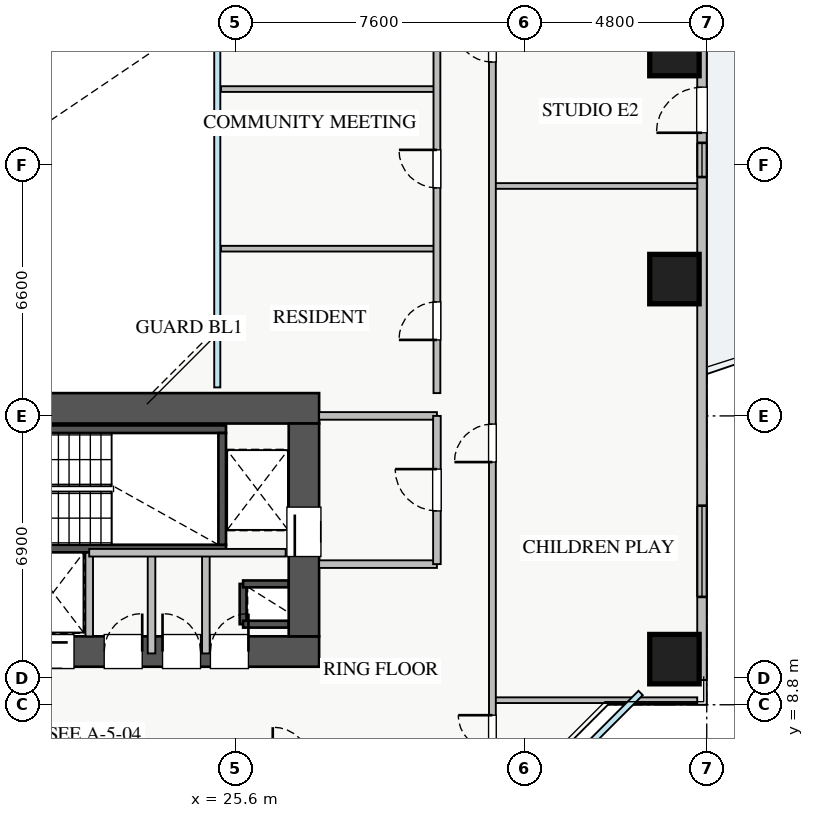
"""IFC4 building model, lengths in metres.
Left out: names, types, materials, properties, quantities, classifications, styles, units other than length and angle.
Written with IfcOpenShell. Run it as: python <this file> out.ifc"""

import sys

from ifc_helpers import new_model, si_unit, direction, frame, frame_2d, origin, origin_2d, place, context, subcontext, project, spatial, rectangle, extrude, source, transform, mapped, element, fill, save


model = new_model("IFC4")
c1 = context("Model", 3, precision=1e-05, world=origin(), true_north=direction((0.0, 1.0)))
c2 = subcontext(c1, "Body", "Model", "MODEL_VIEW")
j1 = project(units=[si_unit("LENGTHUNIT", "METRE"), si_unit("PLANEANGLEUNIT", "RADIAN")], contexts=[c1])
p1 = place(None, origin())
s1 = spatial("IfcSite", under=j1, at=p1, CompositionType="ELEMENT")
p2 = place(p1, origin())
s2 = spatial("IfcBuilding", under=s1, at=p2, CompositionType="ELEMENT")
p3 = place(p2, frame((0.0, 0.0, 66.5)))
s3 = spatial("IfcBuildingStorey", under=s2, at=p3, CompositionType="ELEMENT", Elevation=66.5)
p4 = place(p3, frame((25.8, 10.92, 0.0), z_axis=(0.0, 0.0, 1.0), x_axis=(0.0, 1.0, 0.0)))
e1 = element("IfcWall", 1, at=p4, inside=s3, PredefinedType="SHEAR", context=c2, shape_type="SweptSolid", body=[
    extrude(rectangle(XDim=1.06, YDim=0.18, at=frame_2d((0.53, 0.0))), origin(), (0.0, 0.0, 1.0), 3.07),
])
for number, where, z_axis, x_axis in (
    (2, (25.8, 11.98, 0.0), (0.0, 0.0, 1.0), (1.0, 0.0, 0.0)),
    (3, (25.8, 10.92, 0.0), (0.0, 0.0, 1.0), (1.0, 0.0, 0.0)),
):
    element("IfcWall", number, at=place(p3, frame(where, z_axis=z_axis, x_axis=x_axis)), inside=s3, PredefinedType="SHEAR", context=c2, shape_type="SweptSolid", body=[
        extrude(rectangle(XDim=1.2, YDim=0.18, at=frame_2d((0.6, 0.0))), origin(), (0.0, 0.0, 1.0), 3.07),
    ])
p5 = place(p3, frame((19.88, 12.8, 0.0), z_axis=(0.0, 0.0, 1.0), x_axis=(1.0, 0.0, 0.0)))
e4 = element("IfcWall", 4, at=p5, inside=s3, PredefinedType="SHEAR", context=c2, shape_type="SweptSolid", body=[
    extrude(rectangle(XDim=1.87, YDim=0.18, at=frame_2d((0.935, 0.0))), origin(), (0.0, 0.0, 1.0), 3.07),
])
p6 = place(p3, frame((18.2, 12.91, 0.0), z_axis=(0.0, 0.0, 1.0), x_axis=(1.0, 0.0, 0.0)))
e5 = element("IfcWall", 5, at=p6, inside=s3, PredefinedType="SHEAR", context=c2, shape_type="SweptSolid", body=[
    extrude(rectangle(XDim=7.15, YDim=0.2, at=frame_2d((3.575, 0.0))), origin(), (0.0, 0.0, 1.0), 3.25),
])
p7 = place(p6, frame((0.35, 0.0, 0.0)))
e6 = element("IfcOpeningElement", 6, at=p7, cuts=e5, PredefinedType="OPENING", context=c2, shape_type="SweptSolid", body=[
    extrude(rectangle(XDim=1.1, YDim=2.05, at=frame_2d((0.55, 1.025))), frame((0.0, 0.11, 0.0), z_axis=(0.0, -1.0, 0.0), x_axis=(1.0, 0.0, 0.0)), (0.0, 0.0, 1.0), 0.22),
])
p8 = place(p3, frame((18.2, 16.05, 0.0), z_axis=(0.0, 0.0, 1.0), x_axis=(1.0, 0.0, 0.0)))
e7 = element("IfcWall", 7, at=p8, inside=s3, PredefinedType="SHEAR", context=c2, shape_type="SweptSolid", body=[
    extrude(rectangle(XDim=7.15, YDim=0.2, at=frame_2d((3.575, 0.0))), origin(), (0.0, 0.0, 1.0), 3.25),
])
p9 = place(p3, frame((25.25, 13.01, 0.0), z_axis=(0.0, 0.0, 1.0), x_axis=(0.0, 1.0, 0.0)))
e8 = element("IfcWall", 8, at=p9, inside=s3, PredefinedType="SHEAR", context=c2, shape_type="SweptSolid", body=[
    extrude(rectangle(XDim=2.94, YDim=0.2, at=frame_2d((1.47, 0.0))), origin(), (0.0, 0.0, 1.0), 3.25),
])
p10 = place(p3, frame((10.2, 10.2, 0.0), z_axis=(0.0, 0.0, 1.0), x_axis=(1.0, 0.0, 0.0)))
e9 = element("IfcWall", 9, at=p10, inside=s3, PredefinedType="SHEAR", context=c2, shape_type="SweptSolid", body=[
    extrude(rectangle(XDim=17.6, YDim=0.8, at=frame_2d((8.8, 0.0))), origin(), (0.0, 0.0, 1.0), 3.25),
])
p11 = place(p10, frame((1.15, 0.0, 0.0)))
e10 = element("IfcOpeningElement", 10, at=p11, cuts=e9, PredefinedType="OPENING", context=c2, shape_type="SweptSolid", body=[
    extrude(rectangle(XDim=1.1, YDim=2.05, at=frame_2d((0.55, 1.025))), frame((0.0, 0.41, 0.0), z_axis=(0.0, -1.0, 0.0), x_axis=(1.0, 0.0, 0.0)), (0.0, 0.0, 1.0), 0.82),
])
p12 = place(p10, frame((8.3, 0.0, 0.0)))
e11 = element("IfcOpeningElement", 11, at=p12, cuts=e9, PredefinedType="OPENING", context=c2, shape_type="SweptSolid", body=[
    extrude(rectangle(XDim=1.1, YDim=2.05, at=frame_2d((0.55, 1.025))), frame((0.0, 0.41, 0.0), z_axis=(0.0, -1.0, 0.0), x_axis=(1.0, 0.0, 0.0)), (0.0, 0.0, 1.0), 0.82),
])
p13 = place(p10, frame((10.05, 0.0, 0.0)))
e12 = element("IfcOpeningElement", 12, at=p13, cuts=e9, PredefinedType="OPENING", context=c2, shape_type="SweptSolid", body=[
    extrude(rectangle(XDim=1.1, YDim=2.05, at=frame_2d((0.55, 1.025))), frame((0.0, 0.41, 0.0), z_axis=(0.0, -1.0, 0.0), x_axis=(1.0, 0.0, 0.0)), (0.0, 0.0, 1.0), 0.82),
])
p14 = place(p10, frame((14.74, 0.0, 0.0)))
e13 = element("IfcOpeningElement", 13, at=p14, cuts=e9, PredefinedType="OPENING", context=c2, shape_type="SweptSolid", body=[
    extrude(rectangle(XDim=1.0, YDim=2.05, at=frame_2d((0.5, 1.025))), frame((0.0, 0.41, 0.0), z_axis=(0.0, -1.0, 0.0), x_axis=(1.0, 0.0, 0.0)), (0.0, 0.0, 1.0), 0.82),
])
p15 = place(p10, frame((11.945, 0.0, 0.0)))
e14 = element("IfcOpeningElement", 14, at=p15, cuts=e9, PredefinedType="OPENING", context=c2, shape_type="SweptSolid", body=[
    extrude(rectangle(XDim=1.0, YDim=2.05, at=frame_2d((0.5, 1.025))), frame((0.0, 0.41, 0.0), z_axis=(0.0, -1.0, 0.0), x_axis=(1.0, 0.0, 0.0)), (0.0, 0.0, 1.0), 0.82),
])
p16 = place(p10, frame((13.48, 0.0, 0.0)))
e15 = element("IfcOpeningElement", 15, at=p16, cuts=e9, PredefinedType="OPENING", context=c2, shape_type="SweptSolid", body=[
    extrude(rectangle(XDim=1.0, YDim=2.05, at=frame_2d((0.5, 1.025))), frame((0.0, 0.41, 0.0), z_axis=(0.0, -1.0, 0.0), x_axis=(1.0, 0.0, 0.0)), (0.0, 0.0, 1.0), 0.82),
])
p17 = place(p3, frame((10.2, 16.6, 0.0), z_axis=(0.0, 0.0, 1.0), x_axis=(1.0, 0.0, 0.0)))
e16 = element("IfcWall", 16, at=p17, inside=s3, PredefinedType="SHEAR", context=c2, shape_type="SweptSolid", body=[
    extrude(rectangle(XDim=17.6, YDim=0.8, at=frame_2d((8.8, 0.0))), origin(), (0.0, 0.0, 1.0), 3.25),
])
p18 = place(p3, frame((27.4, 10.6, 0.0), z_axis=(0.0, 0.0, 1.0), x_axis=(0.0, 1.0, 0.0)))
e17 = element("IfcWall", 17, at=p18, inside=s3, PredefinedType="SHEAR", context=c2, shape_type="SweptSolid", body=[
    extrude(rectangle(XDim=5.6, YDim=0.8, at=frame_2d((2.8, 0.0))), origin(), (0.0, 0.0, 1.0), 3.25),
])
p19 = place(p18, frame((2.1, 0.0, 0.0)))
e18 = element("IfcOpeningElement", 18, at=p19, cuts=e17, PredefinedType="OPENING", context=c2, shape_type="SweptSolid", body=[
    extrude(rectangle(XDim=1.3, YDim=2.05, at=frame_2d((0.65, 1.025))), frame((0.0, 0.41, 0.0), z_axis=(0.0, -1.0, 0.0), x_axis=(1.0, 0.0, 0.0)), (0.0, 0.0, 1.0), 0.82),
])
m1 = source(origin(), c2, "Body", "SweptSolid", [
    extrude(rectangle(XDim=1.3, YDim=1.3, at=origin_2d()), origin(), (0.0, 0.0, 1.0), 3.25),
])
for number, where, z_axis, x_axis in (
    (19, (37.15, 10.0, 0.0), (0.0, 0.0, 1.0), (1.0, 0.0, 0.0)),
    (20, (37.15, 20.0, 0.0), (0.0, 0.0, 1.0), (1.0, 0.0, 0.0)),
    (21, (37.15, 26.0, 0.0), (0.0, 0.0, 1.0), (1.0, 0.0, 0.0)),
):
    element("IfcColumn", number, at=place(p3, frame(where, z_axis=z_axis, x_axis=x_axis)), inside=s3, PredefinedType="COLUMN", context=c2, shape_type="MappedRepresentation", body=[
        mapped(m1, transform((0.0, 0.0, 0.0), x_axis=(1.0, 0.0, 0.0), y_axis=(0.0, 1.0, 0.0), z_axis=(0.0, 0.0, 1.0), scale=1.0)),
    ])
p20 = place(p3, frame((37.875, 9.45, 0.0), z_axis=(0.0, 0.0, 1.0), x_axis=(0.0, 1.0, 0.0)))
e22 = element("IfcWall", 22, at=p20, inside=s3, PredefinedType="STANDARD", context=c2, shape_type="SweptSolid", body=[
    extrude(rectangle(XDim=27.1, YDim=0.25, at=frame_2d((13.55, 0.0))), origin(), (0.0, 0.0, 1.0), 2.61),
])
p21 = place(p20, frame((14.4, 0.0, 0.0)))
e23 = element("IfcOpeningElement", 23, at=p21, cuts=e22, PredefinedType="OPENING", context=c2, shape_type="SweptSolid", body=[
    extrude(rectangle(XDim=1.2, YDim=2.1, at=frame_2d((0.6, 1.05))), frame((0.0, 0.135, 0.0), z_axis=(0.0, -1.0, 0.0), x_axis=(1.0, 0.0, 0.0)), (0.0, 0.0, 1.0), 0.27),
])
p22 = place(p20, frame((2.188, 0.0, 0.9)))
e24 = element("IfcOpeningElement", 24, at=p22, cuts=e22, PredefinedType="OPENING", context=c2, shape_type="SweptSolid", body=[
    extrude(rectangle(XDim=2.4, YDim=1.48, at=frame_2d((1.2, 0.74))), frame((0.0, 0.135, 0.0), z_axis=(0.0, -1.0, 0.0), x_axis=(1.0, 0.0, 0.0)), (0.0, 0.0, 1.0), 0.27),
])
p23 = place(p20, frame((22.663, 0.0, 0.9)))
e25 = element("IfcOpeningElement", 25, at=p23, cuts=e22, PredefinedType="OPENING", context=c2, shape_type="SweptSolid", body=[
    extrude(rectangle(XDim=2.1, YDim=1.48, at=frame_2d((1.05, 0.74))), frame((0.0, 0.135, 0.0), z_axis=(0.0, -1.0, 0.0), x_axis=(1.0, 0.0, 0.0)), (0.0, 0.0, 1.0), 0.27),
])
p24 = place(p20, frame((13.235, 0.0, 0.9)))
e26 = element("IfcOpeningElement", 26, at=p24, cuts=e22, PredefinedType="OPENING", context=c2, shape_type="SweptSolid", body=[
    extrude(rectangle(XDim=0.9, YDim=1.2, at=frame_2d((0.45, 0.6))), frame((0.0, 0.135, 0.0), z_axis=(0.0, -1.0, 0.0), x_axis=(1.0, 0.0, 0.0)), (0.0, 0.0, 1.0), 0.27),
])
for number, where, z_axis, x_axis in (
    (27, (27.8, 16.4, 0.0), (0.0, 0.0, 1.0), (1.0, 0.0, 0.0)),
    (28, (27.8, 12.5, 0.0), (0.0, 0.0, 1.0), (1.0, 0.0, 0.0)),
):
    element("IfcWall", number, at=place(p3, frame(where, z_axis=z_axis, x_axis=x_axis)), inside=s3, PredefinedType="PARTITIONING", context=c2, shape_type="SweptSolid", body=[
        extrude(rectangle(XDim=3.1, YDim=0.2, at=frame_2d((1.55, 0.0))), origin(), (0.0, 0.0, 1.0), 3.07),
    ])
p25 = place(p3, frame((30.9, 12.5, 0.0), z_axis=(0.0, 0.0, 1.0), x_axis=(0.0, 1.0, 0.0)))
e29 = element("IfcWall", 29, at=p25, inside=s3, PredefinedType="PARTITIONING", context=c2, shape_type="SweptSolid", body=[
    extrude(rectangle(XDim=3.9, YDim=0.2, at=frame_2d((1.95, 0.0))), origin(), (0.0, 0.0, 1.0), 3.07),
])
p26 = place(p25, frame((1.4, 0.0, 0.0)))
e30 = element("IfcOpeningElement", 30, at=p26, cuts=e29, PredefinedType="OPENING", context=c2, shape_type="SweptSolid", body=[
    extrude(rectangle(XDim=1.1, YDim=2.05, at=frame_2d((0.55, 1.025))), frame((0.0, 0.11, 0.0), z_axis=(0.0, -1.0, 0.0), x_axis=(1.0, 0.0, 0.0)), (0.0, 0.0, 1.0), 0.22),
])
p27 = place(p3, frame((24.82, 10.15, 0.0), z_axis=(0.0, 0.0, 1.0), x_axis=(0.0, 1.0, 0.0)))
e31 = element("IfcWall", 31, at=p27, inside=s3, PredefinedType="PARTITIONING", context=c2, shape_type="SweptSolid", body=[
    extrude(rectangle(XDim=2.65, YDim=0.2, at=frame_2d((1.325, 0.0))), origin(), (0.0, 0.0, 1.0), 3.07),
])
p28 = place(p3, frame((21.75, 10.6, 0.0), z_axis=(0.0, 0.0, 1.0), x_axis=(0.0, 1.0, 0.0)))
e32 = element("IfcWall", 32, at=p28, inside=s3, PredefinedType="PARTITIONING", context=c2, shape_type="SweptSolid", body=[
    extrude(rectangle(XDim=2.2, YDim=0.2, at=frame_2d((1.1, 0.0))), origin(), (0.0, 0.0, 1.0), 3.07),
])
p29 = place(p3, frame((23.39, 10.15, 0.0), z_axis=(0.0, 0.0, 1.0), x_axis=(0.0, 1.0, 0.0)))
e33 = element("IfcWall", 33, at=p29, inside=s3, PredefinedType="PARTITIONING", context=c2, shape_type="SweptSolid", body=[
    extrude(rectangle(XDim=2.65, YDim=0.2, at=frame_2d((1.325, 0.0))), origin(), (0.0, 0.0, 1.0), 3.07),
])
p30 = place(p3, frame((21.75, 12.8, 0.0), z_axis=(0.0, 0.0, 1.0), x_axis=(1.0, 0.0, 0.0)))
e34 = element("IfcWall", 34, at=p30, inside=s3, PredefinedType="PARTITIONING", context=c2, shape_type="SweptSolid", body=[
    extrude(rectangle(XDim=5.17, YDim=0.2, at=frame_2d((2.585, 0.0))), origin(), (0.0, 0.0, 1.0), 3.07),
])
for number, where, z_axis, x_axis in (
    (35, (32.36, 8.92, 0.0), (0.0, 0.0, 1.0), (1.0, 0.0, 0.0)),
    (36, (32.36, 22.45, 0.0), (0.0, 0.0, 1.0), (1.0, 0.0, 0.0)),
):
    element("IfcWall", number, at=place(p3, frame(where, z_axis=z_axis, x_axis=x_axis)), inside=s3, PredefinedType="PARTITIONING", context=c2, shape_type="SweptSolid", body=[
        extrude(rectangle(XDim=5.39, YDim=0.15, at=frame_2d((2.695, 0.0))), origin(), (0.0, 0.0, 1.0), 3.07),
    ])
p31 = place(p3, frame((32.36, 7.21, 0.0), z_axis=(0.0, 0.0, 1.0), x_axis=(0.0, 1.0, 0.0)))
e37 = element("IfcWall", 37, at=p31, inside=s3, PredefinedType="PARTITIONING", context=c2, shape_type="SweptSolid", body=[
    extrude(rectangle(XDim=31.23, YDim=0.18, at=frame_2d((15.615, 0.0))), origin(), (0.0, 0.0, 1.0), 2.715),
])
p32 = place(p31, frame((30.09, 0.0, 0.0)))
e38 = element("IfcOpeningElement", 38, at=p32, cuts=e37, PredefinedType="OPENING", context=c2, shape_type="SweptSolid", body=[
    extrude(rectangle(XDim=0.9, YDim=2.05, at=frame_2d((0.45, 1.025))), frame((0.0, 0.1, 0.0), z_axis=(0.0, -1.0, 0.0), x_axis=(1.0, 0.0, 0.0)), (0.0, 0.0, 1.0), 0.2),
])
p33 = place(p31, frame((0.415, 0.0, 0.0)))
e39 = element("IfcOpeningElement", 39, at=p33, cuts=e37, PredefinedType="OPENING", context=c2, shape_type="SweptSolid", body=[
    extrude(rectangle(XDim=0.9, YDim=2.05, at=frame_2d((0.45, 1.025))), frame((0.0, 0.1, 0.0), z_axis=(0.0, -1.0, 0.0), x_axis=(1.0, 0.0, 0.0)), (0.0, 0.0, 1.0), 0.2),
])
p34 = place(p31, frame((7.975, 0.0, 0.0)))
e40 = element("IfcOpeningElement", 40, at=p34, cuts=e37, PredefinedType="OPENING", context=c2, shape_type="SweptSolid", body=[
    extrude(rectangle(XDim=1.0, YDim=2.05, at=frame_2d((0.5, 1.025))), frame((0.0, 0.1, 0.0), z_axis=(0.0, -1.0, 0.0), x_axis=(1.0, 0.0, 0.0)), (0.0, 0.0, 1.0), 0.2),
])
p35 = place(p31, frame((18.5, 0.0, 0.0)))
e41 = element("IfcOpeningElement", 41, at=p35, cuts=e37, PredefinedType="OPENING", context=c2, shape_type="SweptSolid", body=[
    extrude(rectangle(XDim=1.0, YDim=2.05, at=frame_2d((0.5, 1.025))), frame((0.0, 0.1, 0.0), z_axis=(0.0, -1.0, 0.0), x_axis=(1.0, 0.0, 0.0)), (0.0, 0.0, 1.0), 0.2),
])
for number, where, z_axis, x_axis in (
    (42, (25.22, 20.8, 0.0), (0.0, 0.0, 1.0), (1.0, 0.0, 0.0)),
    (43, (25.22, 25.0, 0.0), (0.0, 0.0, 1.0), (1.0, 0.0, 0.0)),
):
    element("IfcWall", number, at=place(p3, frame(where, z_axis=z_axis, x_axis=x_axis)), inside=s3, PredefinedType="PARTITIONING", context=c2, shape_type="SweptSolid", body=[
        extrude(rectangle(XDim=5.68, YDim=0.15, at=frame_2d((2.84, 0.0))), origin(), (0.0, 0.0, 1.0), 3.07),
    ])
p36 = place(p3, frame((30.9, 17.0, 0.0), z_axis=(0.0, 0.0, 1.0), x_axis=(0.0, 1.0, 0.0)))
e44 = element("IfcWall", 44, at=p36, inside=s3, PredefinedType="PARTITIONING", context=c2, shape_type="SweptSolid", body=[
    extrude(rectangle(XDim=12.0, YDim=0.18, at=frame_2d((6.0, 0.0))), origin(), (0.0, 0.0, 1.0), 3.07),
])
p37 = place(p36, frame((1.4, 0.0, 0.0)))
e45 = element("IfcOpeningElement", 45, at=p37, cuts=e44, PredefinedType="OPENING", context=c2, shape_type="SweptSolid", body=[
    extrude(rectangle(XDim=1.0, YDim=2.05, at=frame_2d((0.5, 1.025))), frame((0.0, 0.1, 0.0), z_axis=(0.0, -1.0, 0.0), x_axis=(1.0, 0.0, 0.0)), (0.0, 0.0, 1.0), 0.2),
])
p38 = place(p36, frame((5.4, 0.0, 0.0)))
e46 = element("IfcOpeningElement", 46, at=p38, cuts=e44, PredefinedType="OPENING", context=c2, shape_type="SweptSolid", body=[
    extrude(rectangle(XDim=1.0, YDim=2.05, at=frame_2d((0.5, 1.025))), frame((0.0, 0.1, 0.0), z_axis=(0.0, -1.0, 0.0), x_axis=(1.0, 0.0, 0.0)), (0.0, 0.0, 1.0), 0.2),
])
p39 = place(p36, frame((9.4, 0.0, 0.0)))
e47 = element("IfcOpeningElement", 47, at=p39, cuts=e44, PredefinedType="OPENING", context=c2, shape_type="SweptSolid", body=[
    extrude(rectangle(XDim=1.0, YDim=2.05, at=frame_2d((0.5, 1.025))), frame((0.0, 0.1, 0.0), z_axis=(0.0, -1.0, 0.0), x_axis=(1.0, 0.0, 0.0)), (0.0, 0.0, 1.0), 0.2),
])
m2 = source(origin(), c2, "Body", "SweptSolid", [
    extrude(rectangle(XDim=1.2, YDim=2.1, at=frame_2d((0.6, 1.05))), frame((0.0, 0.025, 0.0), z_axis=(0.0, -1.0, 0.0), x_axis=(1.0, 0.0, 0.0)), (0.0, 0.0, 1.0), 0.05),
])
p40 = place(p21, origin())
e48 = element("IfcDoor", 48, at=p40, inside=s3, OperationType="SINGLE_SWING_LEFT", PredefinedType="DOOR", context=c2, shape_type="MappedRepresentation", body=[
    mapped(m2, transform((0.0, 0.0, 0.0), x_axis=(1.0, 0.0, 0.0), y_axis=(0.0, 1.0, 0.0), z_axis=(0.0, 0.0, 1.0), scale=1.0)),
])
fill(e23, e48)
m3 = source(origin(), c2, "Body", "SweptSolid", [
    extrude(rectangle(XDim=2.4, YDim=1.48, at=frame_2d((1.2, 0.74))), frame((0.0, 0.03, 0.0), z_axis=(0.0, -1.0, 0.0), x_axis=(1.0, 0.0, 0.0)), (0.0, 0.0, 1.0), 0.06),
])
p41 = place(p22, origin())
e49 = element("IfcWindow", 49, at=p41, inside=s3, PartitioningType="TRIPLE_PANEL_VERTICAL", PredefinedType="WINDOW", context=c2, shape_type="MappedRepresentation", body=[
    mapped(m3, transform((0.0, 0.0, 0.0), x_axis=(1.0, 0.0, 0.0), y_axis=(0.0, 1.0, 0.0), z_axis=(0.0, 0.0, 1.0), scale=1.0)),
])
fill(e24, e49)
m4 = source(origin(), c2, "Body", "SweptSolid", [
    extrude(rectangle(XDim=1.3, YDim=2.05, at=frame_2d((0.65, 1.025))), frame((0.0, 0.025, 0.0), z_axis=(0.0, -1.0, 0.0), x_axis=(1.0, 0.0, 0.0)), (0.0, 0.0, 1.0), 0.05),
])
p42 = place(p19, origin())
e50 = element("IfcDoor", 50, at=p42, inside=s3, OperationType="SLIDING_TO_RIGHT", PredefinedType="DOOR", context=c2, shape_type="MappedRepresentation", body=[
    mapped(m4, transform((0.0, 0.0, 0.0), x_axis=(1.0, 0.0, 0.0), y_axis=(0.0, 1.0, 0.0), z_axis=(0.0, 0.0, 1.0), scale=1.0)),
])
fill(e18, e50)
m5 = source(origin(), c2, "Body", "SweptSolid", [
    extrude(rectangle(XDim=1.1, YDim=2.05, at=frame_2d((0.55, 1.025))), frame((0.0, 0.025, 0.0), z_axis=(0.0, -1.0, 0.0), x_axis=(1.0, 0.0, 0.0)), (0.0, 0.0, 1.0), 0.05),
])
p43 = place(p13, origin())
e51 = element("IfcDoor", 51, at=p43, inside=s3, OperationType="SLIDING_TO_RIGHT", PredefinedType="DOOR", context=c2, shape_type="MappedRepresentation", body=[
    mapped(m5, transform((0.0, 0.0, 0.0), x_axis=(1.0, 0.0, 0.0), y_axis=(0.0, 1.0, 0.0), z_axis=(0.0, 0.0, 1.0), scale=1.0)),
])
fill(e12, e51)
m6 = source(origin(), c2, "Body", "SweptSolid", [
    extrude(rectangle(XDim=1.0, YDim=2.05, at=frame_2d((0.5, 1.025))), frame((0.0, 0.025, 0.0), z_axis=(0.0, -1.0, 0.0), x_axis=(1.0, 0.0, 0.0)), (0.0, 0.0, 1.0), 0.05),
])
p44 = place(p14, origin())
e52 = element("IfcDoor", 52, at=p44, inside=s3, OperationType="SINGLE_SWING_RIGHT", PredefinedType="DOOR", context=c2, shape_type="MappedRepresentation", body=[
    mapped(m6, transform((0.0, 0.0, 0.0), x_axis=(1.0, 0.0, 0.0), y_axis=(0.0, 1.0, 0.0), z_axis=(0.0, 0.0, 1.0), scale=1.0)),
])
fill(e13, e52)
p45 = place(p15, origin())
e53 = element("IfcDoor", 53, at=p45, inside=s3, OperationType="SINGLE_SWING_RIGHT", PredefinedType="DOOR", context=c2, shape_type="MappedRepresentation", body=[
    mapped(m6, transform((0.0, 0.0, 0.0), x_axis=(1.0, 0.0, 0.0), y_axis=(0.0, 1.0, 0.0), z_axis=(0.0, 0.0, 1.0), scale=1.0)),
])
fill(e14, e53)
p46 = place(p16, origin())
e54 = element("IfcDoor", 54, at=p46, inside=s3, OperationType="SINGLE_SWING_LEFT", PredefinedType="DOOR", context=c2, shape_type="MappedRepresentation", body=[
    mapped(m6, transform((0.0, 0.0, 0.0), x_axis=(1.0, 0.0, 0.0), y_axis=(0.0, 1.0, 0.0), z_axis=(0.0, 0.0, 1.0), scale=1.0)),
])
fill(e15, e54)
p47 = place(p26, origin())
e55 = element("IfcDoor", 55, at=p47, inside=s3, OperationType="SINGLE_SWING_RIGHT", PredefinedType="DOOR", context=c2, shape_type="MappedRepresentation", body=[
    mapped(m5, transform((0.0, 0.0, 0.0), x_axis=(1.0, 0.0, 0.0), y_axis=(0.0, 1.0, 0.0), z_axis=(0.0, 0.0, 1.0), scale=1.0)),
])
fill(e30, e55)
m7 = source(origin(), c2, "Body", "SweptSolid", [
    extrude(rectangle(XDim=0.9, YDim=2.05, at=frame_2d((0.45, 1.025))), frame((0.0, 0.025, 0.0), z_axis=(0.0, -1.0, 0.0), x_axis=(1.0, 0.0, 0.0)), (0.0, 0.0, 1.0), 0.05),
])
p48 = place(p33, origin())
e56 = element("IfcDoor", 56, at=p48, inside=s3, OperationType="SINGLE_SWING_RIGHT", PredefinedType="DOOR", context=c2, shape_type="MappedRepresentation", body=[
    mapped(m7, transform((0.0, 0.0, 0.0), x_axis=(1.0, 0.0, 0.0), y_axis=(0.0, 1.0, 0.0), z_axis=(0.0, 0.0, 1.0), scale=1.0)),
])
fill(e39, e56)
p49 = place(p34, origin())
e57 = element("IfcDoor", 57, at=p49, inside=s3, OperationType="SINGLE_SWING_LEFT", PredefinedType="DOOR", context=c2, shape_type="MappedRepresentation", body=[
    mapped(m6, transform((0.0, 0.0, 0.0), x_axis=(1.0, 0.0, 0.0), y_axis=(0.0, 1.0, 0.0), z_axis=(0.0, 0.0, 1.0), scale=1.0)),
])
fill(e40, e57)
p50 = place(p35, origin())
e58 = element("IfcDoor", 58, at=p50, inside=s3, OperationType="SINGLE_SWING_RIGHT", PredefinedType="DOOR", context=c2, shape_type="MappedRepresentation", body=[
    mapped(m6, transform((0.0, 0.0, 0.0), x_axis=(1.0, 0.0, 0.0), y_axis=(0.0, 1.0, 0.0), z_axis=(0.0, 0.0, 1.0), scale=1.0)),
])
fill(e41, e58)
p51 = place(p37, origin())
e59 = element("IfcDoor", 59, at=p51, inside=s3, OperationType="SINGLE_SWING_LEFT", PredefinedType="DOOR", context=c2, shape_type="MappedRepresentation", body=[
    mapped(m6, transform((0.0, 0.0, 0.0), x_axis=(1.0, 0.0, 0.0), y_axis=(0.0, 1.0, 0.0), z_axis=(0.0, 0.0, 1.0), scale=1.0)),
])
fill(e45, e59)
p52 = place(p38, origin())
e60 = element("IfcDoor", 60, at=p52, inside=s3, OperationType="SINGLE_SWING_RIGHT", PredefinedType="DOOR", context=c2, shape_type="MappedRepresentation", body=[
    mapped(m6, transform((0.0, 0.0, 0.0), x_axis=(1.0, 0.0, 0.0), y_axis=(0.0, 1.0, 0.0), z_axis=(0.0, 0.0, 1.0), scale=1.0)),
])
fill(e46, e60)
m8 = source(origin(), c2, "Body", "SweptSolid", [
    extrude(rectangle(XDim=0.9, YDim=1.2, at=frame_2d((0.45, 0.6))), frame((0.0, 0.03, 0.0), z_axis=(0.0, -1.0, 0.0), x_axis=(1.0, 0.0, 0.0)), (0.0, 0.0, 1.0), 0.06),
])
p53 = place(p24, origin())
e61 = element("IfcWindow", 61, at=p53, inside=s3, PartitioningType="SINGLE_PANEL", PredefinedType="WINDOW", context=c2, shape_type="MappedRepresentation", body=[
    mapped(m8, transform((0.0, 0.0, 0.0), x_axis=(1.0, 0.0, 0.0), y_axis=(0.0, 1.0, 0.0), z_axis=(0.0, 0.0, 1.0), scale=1.0)),
])
fill(e26, e61)
save(model, sys.argv[1])
